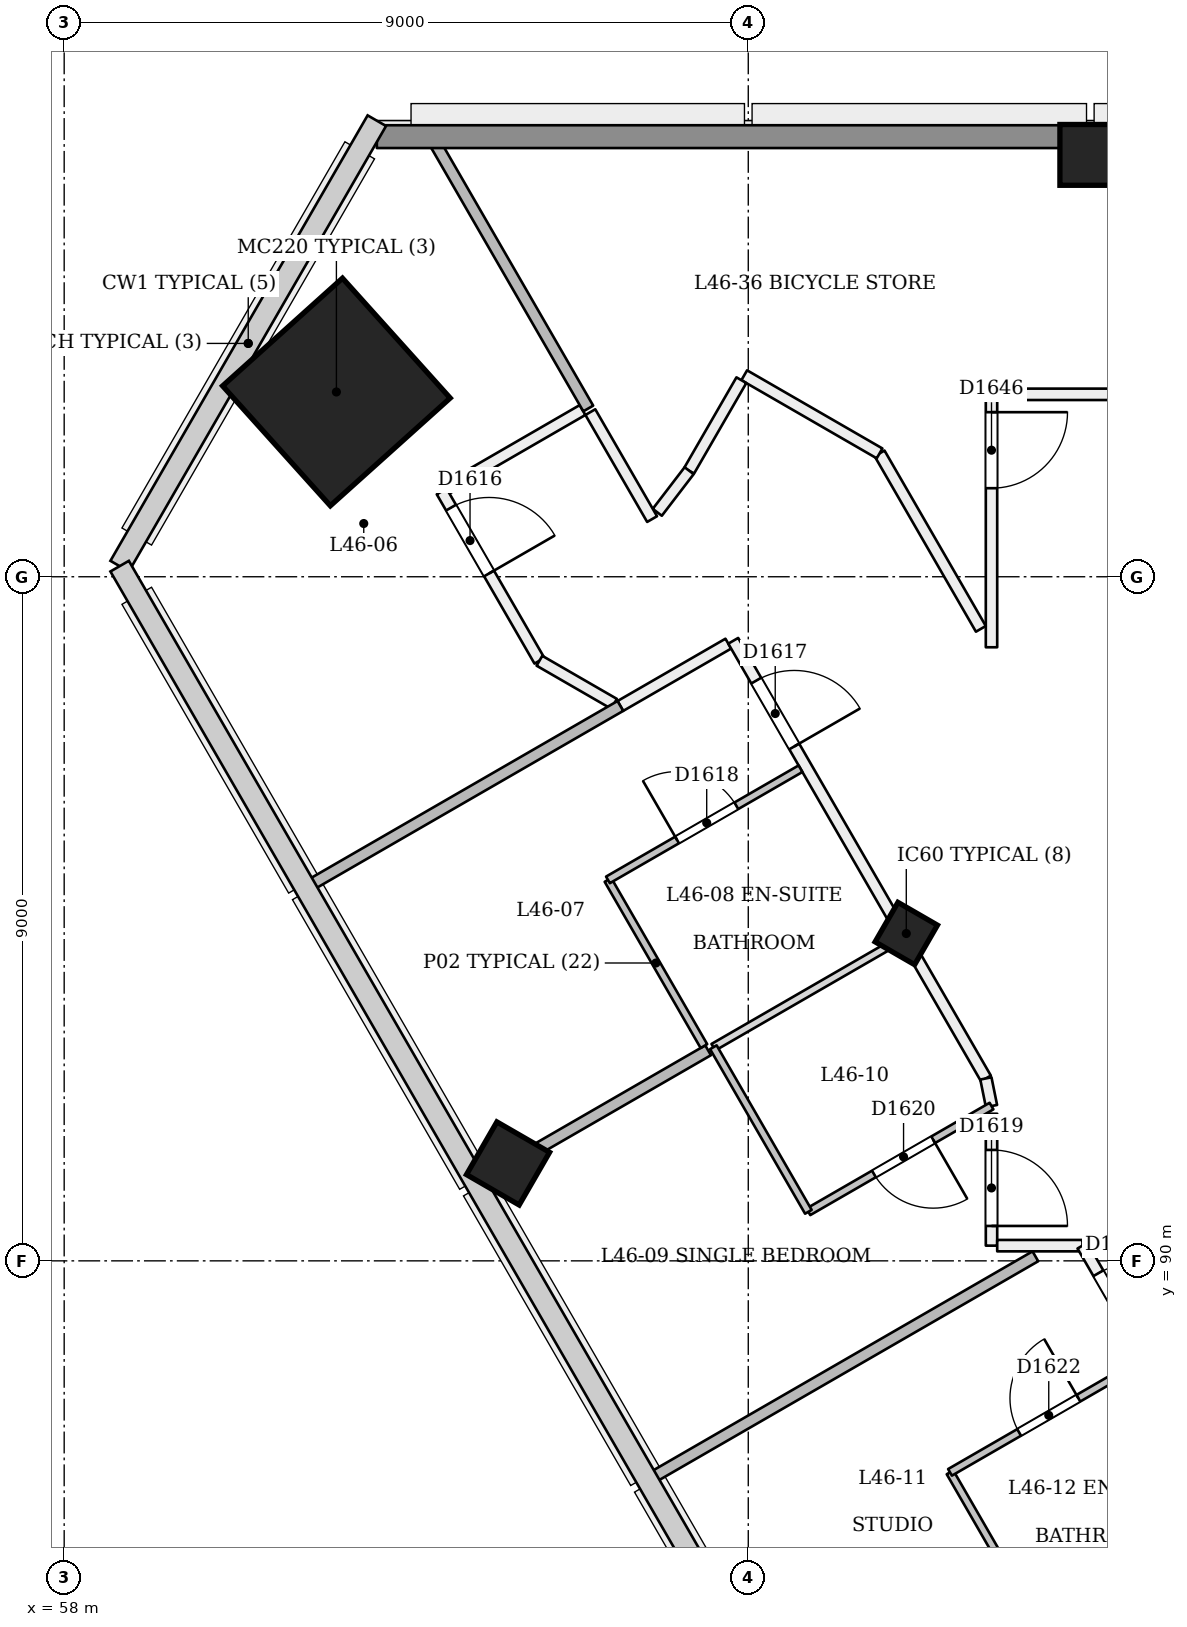
"""IFC4 building model, lengths in metres.
Left out: names, types, materials, properties, quantities, classifications, styles, units other than length and angle.
Written with IfcOpenShell. Run it as: python <this file> out.ifc"""

import sys

from ifc_helpers import new_model, si_unit, direction, frame, frame_2d, origin, origin_2d, place, context, subcontext, project, spatial, rectangle, extrude, element, fill, save


model = new_model("IFC4")
c1 = context("Model", 3, precision=1e-05, world=origin(), true_north=direction((0.0, 1.0)))
c2 = subcontext(c1, "Body", "Model", "MODEL_VIEW")
j1 = project(units=[si_unit("LENGTHUNIT", "METRE"), si_unit("PLANEANGLEUNIT", "RADIAN")], contexts=[c1])
p1 = place(None, origin())
s1 = spatial("IfcSite", under=j1, at=p1, CompositionType="ELEMENT")
p2 = place(p1, origin())
s2 = spatial("IfcBuilding", under=s1, at=p2, CompositionType="ELEMENT")
p3 = place(p2, frame((0.0, 0.0, 178.2)))
s3 = spatial("IfcBuildingStorey", under=s2, at=p3, CompositionType="ELEMENT", Elevation=178.2)
p4 = place(p3, frame((69.052, 94.26, -0.018), z_axis=(0.022222852987, 0.038483477124, 0.999012095419), x_axis=(-0.865642058299, -0.49918203825, 0.038485316572)))
e1 = element("IfcColumn", 1, at=p4, inside=s3, PredefinedType="COLUMN", context=c2, shape_type="SweptSolid", body=[
    extrude(rectangle(XDim=0.6, YDim=0.6, at=origin_2d()), origin(), (0.0, 0.0, 1.0), 3.604),
])
p5 = place(p3, frame((61.547, 101.42, 0.0), z_axis=(0.028401796786, 0.009286506348, 0.999553449666), x_axis=(-0.866206321778, 0.499287135176, 0.019974102218)))
e2 = element("IfcColumn", 2, at=p5, inside=s3, PredefinedType="COLUMN", context=c2, shape_type="SweptSolid", body=[
    extrude(rectangle(XDim=2.12, YDim=2.12, at=origin_2d()), origin(), (0.0, 0.0, 1.0), 3.602),
])
p6 = place(p3, frame((71.5, 104.55, 0.0), z_axis=(0.0, 0.0, 1.0), x_axis=(1.0, 0.0, 0.0)))
e3 = element("IfcColumn", 3, at=p6, inside=s3, PredefinedType="COLUMN", context=c2, shape_type="SweptSolid", body=[
    extrude(rectangle(XDim=0.8, YDim=0.8, at=origin_2d()), origin(), (0.0, 0.0, 1.0), 3.6),
])
p7 = place(p3, frame((63.812, 91.234, -0.024), z_axis=(0.02215519141, 0.038415882353, 0.999016199807), x_axis=(-0.865361947816, -0.499673614488, 0.038405445666)))
e4 = element("IfcColumn", 4, at=p7, inside=s3, PredefinedType="COLUMN", context=c2, shape_type="SweptSolid", body=[
    extrude(rectangle(XDim=0.8, YDim=0.8, at=origin_2d()), origin(), (0.0, 0.0, 1.0), 3.604),
])
p8 = place(p3, frame((64.82, 101.193, 0.0), z_axis=(0.0, 0.0, 1.0), x_axis=(-0.865774039155, -0.500435123793, 0.0)))
e5 = element("IfcWall", 5, at=p8, inside=s3, PredefinedType="PARTITIONING", context=c2, shape_type="SweptSolid", body=[
    extrude(rectangle(XDim=2.066, YDim=0.15, at=frame_2d((1.033, 0.0))), origin(), (0.0, 0.0, 1.0), 3.15),
])
p9 = place(p3, frame((62.967, 100.122, 0.0), z_axis=(0.0, 0.0, 1.0), x_axis=(0.499988145349, -0.866032247962, 0.0)))
e6 = element("IfcWall", 6, at=p9, inside=s3, PredefinedType="PARTITIONING", context=c2, shape_type="SweptSolid", body=[
    extrude(rectangle(XDim=2.572, YDim=0.15, at=frame_2d((1.286, 0.0))), origin(), (0.0, 0.0, 1.0), 3.15),
])
p10 = place(p9, frame((0.246, 0.0, 0.0)))
e7 = element("IfcOpeningElement", 7, at=p10, cuts=e6, PredefinedType="OPENING", context=c2, shape_type="SweptSolid", body=[
    extrude(rectangle(XDim=1.0, YDim=2.1, at=frame_2d((0.5, 1.05))), frame((0.0, 0.085, 0.0), z_axis=(0.0, -1.0, 0.0), x_axis=(1.0, 0.0, 0.0)), (0.0, 0.0, 1.0), 0.171),
])
p11 = place(p3, frame((64.252, 97.895, 0.0), z_axis=(0.0, 0.0, 1.0), x_axis=(0.865966686804, -0.500101687005, 0.0)))
e8 = element("IfcWall", 8, at=p11, inside=s3, PredefinedType="PARTITIONING", context=c2, shape_type="SweptSolid", body=[
    extrude(rectangle(XDim=1.133, YDim=0.15, at=frame_2d((0.566, 0.0))), origin(), (0.0, 0.0, 1.0), 3.15),
])
p12 = place(p3, frame((65.317, 97.3, 0.0), z_axis=(0.0, 0.0, 1.0), x_axis=(0.866016967894, 0.500014611105, 0.0)))
e9 = element("IfcWall", 9, at=p12, inside=s3, PredefinedType="PARTITIONING", context=c2, shape_type="SweptSolid", body=[
    extrude(rectangle(XDim=1.64, YDim=0.15, at=frame_2d((0.82, 0.0))), origin(), (0.0, 0.0, 1.0), 3.15),
])
p13 = place(p3, frame((66.802, 98.157, 0.0), z_axis=(0.0, 0.0, 1.0), x_axis=(0.499982058975, -0.866035761792, 0.0)))
e10 = element("IfcWall", 10, at=p13, inside=s3, PredefinedType="PARTITIONING", context=c2, shape_type="SweptSolid", body=[
    extrude(rectangle(XDim=6.648, YDim=0.15, at=frame_2d((3.324, 0.0))), origin(), (0.0, 0.0, 1.0), 2.75),
])
p14 = place(p13, frame((0.605, 0.0, 0.0)))
e11 = element("IfcOpeningElement", 11, at=p14, cuts=e10, PredefinedType="OPENING", context=c2, shape_type="SweptSolid", body=[
    extrude(rectangle(XDim=1.0, YDim=2.1, at=frame_2d((0.5, 1.05))), frame((0.0, 0.085, 0.0), z_axis=(0.0, -1.0, 0.0), x_axis=(1.0, 0.0, 0.0)), (0.0, 0.0, 1.0), 0.171),
])
p15 = place(p3, frame((70.2, 91.935, 0.0), z_axis=(0.0, 0.0, 1.0), x_axis=(0.0, -1.0, 0.0)))
e12 = element("IfcWall", 12, at=p15, inside=s3, PredefinedType="PARTITIONING", context=c2, shape_type="SweptSolid", body=[
    extrude(rectangle(XDim=1.735, YDim=0.15, at=frame_2d((0.868, 0.0))), origin(), (0.0, 0.0, 1.0), 3.15),
])
p16 = place(p15, frame((0.476, 0.0, 0.0)))
e13 = element("IfcOpeningElement", 13, at=p16, cuts=e12, PredefinedType="OPENING", context=c2, shape_type="SweptSolid", body=[
    extrude(rectangle(XDim=1.0, YDim=2.1, at=frame_2d((0.5, 1.05))), frame((0.0, 0.085, 0.0), z_axis=(0.0, -1.0, 0.0), x_axis=(1.0, 0.0, 0.0)), (0.0, 0.0, 1.0), 0.171),
])
p17 = place(p3, frame((70.275, 90.2, 0.0), z_axis=(0.0, 0.0, 1.0), x_axis=(1.0, 0.0, 0.0)))
e14 = element("IfcWall", 14, at=p17, inside=s3, PredefinedType="PARTITIONING", context=c2, shape_type="SweptSolid", body=[
    extrude(rectangle(XDim=1.122, YDim=0.15, at=frame_2d((0.561, 0.0))), origin(), (0.0, 0.0, 1.0), 3.15),
])
p18 = place(p3, frame((70.126, 92.4, 0.0), z_axis=(0.0, 0.0, 1.0), x_axis=(0.198645351923, -0.980071438294, 0.0)))
e15 = element("IfcWall", 15, at=p18, inside=s3, PredefinedType="PARTITIONING", context=c2, shape_type="SweptSolid", body=[
    extrude(rectangle(XDim=0.371, YDim=0.15, at=frame_2d((0.186, 0.0))), origin(), (0.0, 0.0, 1.0), 3.15),
])
p19 = place(p3, frame((71.396, 90.2, 0.0), z_axis=(0.0, 0.0, 1.0), x_axis=(0.500000568002, -0.866025075848, 0.0)))
e16 = element("IfcWall", 16, at=p19, inside=s3, PredefinedType="PARTITIONING", context=c2, shape_type="SweptSolid", body=[
    extrude(rectangle(XDim=27.077, YDim=0.15, at=frame_2d((13.539, 0.0))), origin(), (0.0, 0.0, 1.0), 2.75),
])
p20 = place(p19, frame((0.419, 0.0, 0.0)))
e17 = element("IfcOpeningElement", 17, at=p20, cuts=e16, PredefinedType="OPENING", context=c2, shape_type="SweptSolid", body=[
    extrude(rectangle(XDim=1.0, YDim=2.1, at=frame_2d((0.5, 1.05))), frame((0.0, 0.085, 0.0), z_axis=(0.0, -1.0, 0.0), x_axis=(1.0, 0.0, 0.0)), (0.0, 0.0, 1.0), 0.171),
])
p21 = place(p19, frame((7.091, 0.0, 0.0)))
e18 = element("IfcOpeningElement", 18, at=p21, cuts=e16, PredefinedType="OPENING", context=c2, shape_type="SweptSolid", body=[
    extrude(rectangle(XDim=1.0, YDim=2.1, at=frame_2d((0.5, 1.05))), frame((0.0, 0.085, 0.0), z_axis=(0.0, -1.0, 0.0), x_axis=(1.0, 0.0, 0.0)), (0.0, 0.0, 1.0), 0.171),
])
p22 = place(p19, frame((9.532, 0.0, 0.0)))
e19 = element("IfcOpeningElement", 19, at=p22, cuts=e16, PredefinedType="OPENING", context=c2, shape_type="SweptSolid", body=[
    extrude(rectangle(XDim=1.0, YDim=2.1, at=frame_2d((0.5, 1.05))), frame((0.0, 0.085, 0.0), z_axis=(0.0, -1.0, 0.0), x_axis=(1.0, 0.0, 0.0)), (0.0, 0.0, 1.0), 0.171),
])
p23 = place(p19, frame((16.091, 0.0, 0.0)))
e20 = element("IfcOpeningElement", 20, at=p23, cuts=e16, PredefinedType="OPENING", context=c2, shape_type="SweptSolid", body=[
    extrude(rectangle(XDim=1.0, YDim=2.1, at=frame_2d((0.5, 1.05))), frame((0.0, 0.085, 0.0), z_axis=(0.0, -1.0, 0.0), x_axis=(1.0, 0.0, 0.0)), (0.0, 0.0, 1.0), 0.171),
])
p24 = place(p19, frame((18.416, 0.0, 0.0)))
e21 = element("IfcOpeningElement", 21, at=p24, cuts=e16, PredefinedType="OPENING", context=c2, shape_type="SweptSolid", body=[
    extrude(rectangle(XDim=1.0, YDim=2.1, at=frame_2d((0.5, 1.05))), frame((0.0, 0.085, 0.0), z_axis=(0.0, -1.0, 0.0), x_axis=(1.0, 0.0, 0.0)), (0.0, 0.0, 1.0), 0.171),
])
p25 = place(p19, frame((25.432, 0.0, 0.0)))
e22 = element("IfcOpeningElement", 22, at=p25, cuts=e16, PredefinedType="OPENING", context=c2, shape_type="SweptSolid", body=[
    extrude(rectangle(XDim=1.2, YDim=2.1, at=frame_2d((0.6, 1.05))), frame((0.0, 0.085, 0.0), z_axis=(0.0, -1.0, 0.0), x_axis=(1.0, 0.0, 0.0)), (0.0, 0.0, 1.0), 0.171),
])
p26 = place(p3, frame((72.0, 101.4, 0.0), z_axis=(0.0, 0.0, 1.0), x_axis=(-1.0, 0.0, 0.0)))
e23 = element("IfcWall", 23, at=p26, inside=s3, PredefinedType="PARTITIONING", context=c2, shape_type="SweptSolid", body=[
    extrude(rectangle(XDim=1.725, YDim=0.15, at=frame_2d((0.863, 0.0))), origin(), (0.0, 0.0, 1.0), 3.15),
])
p27 = place(p3, frame((70.2, 101.4, 0.0), z_axis=(0.0, 0.0, 1.0), x_axis=(0.0, -1.0, 0.0)))
e24 = element("IfcWall", 24, at=p27, inside=s3, PredefinedType="PARTITIONING", context=c2, shape_type="SweptSolid", body=[
    extrude(rectangle(XDim=3.328, YDim=0.15, at=frame_2d((1.664, 0.0))), origin(), (0.0, 0.0, 1.0), 3.15),
])
p28 = place(p27, frame((0.235, 0.0, 0.0)))
e25 = element("IfcOpeningElement", 25, at=p28, cuts=e24, PredefinedType="OPENING", context=c2, shape_type="SweptSolid", body=[
    extrude(rectangle(XDim=1.0, YDim=2.1, at=frame_2d((0.5, 1.05))), frame((0.0, 0.085, 0.0), z_axis=(0.0, -1.0, 0.0), x_axis=(1.0, 0.0, 0.0)), (0.0, 0.0, 1.0), 0.171),
])
p29 = place(p3, frame((70.06, 98.315, 0.0), z_axis=(0.0, 0.0, 1.0), x_axis=(-0.500010524421, 0.866019327422, 0.0)))
e26 = element("IfcWall", 26, at=p29, inside=s3, PredefinedType="PARTITIONING", context=c2, shape_type="SweptSolid", body=[
    extrude(rectangle(XDim=2.666, YDim=0.15, at=frame_2d((1.333, 0.0))), origin(), (0.0, 0.0, 1.0), 3.15),
])
p30 = place(p3, frame((68.727, 100.623, 0.0), z_axis=(0.0, 0.0, 1.0), x_axis=(-0.866027366358, 0.499996600708, 0.0)))
e27 = element("IfcWall", 27, at=p30, inside=s3, PredefinedType="PARTITIONING", context=c2, shape_type="SweptSolid", body=[
    extrude(rectangle(XDim=2.056, YDim=0.15, at=frame_2d((1.028, 0.0))), origin(), (0.0, 0.0, 1.0), 3.15),
])
p31 = place(p3, frame((66.909, 101.586, 0.0), z_axis=(0.0, 0.0, 1.0), x_axis=(-0.499958106649, -0.866049589571, 0.0)))
e28 = element("IfcWall", 28, at=p31, inside=s3, PredefinedType="PARTITIONING", context=c2, shape_type="SweptSolid", body=[
    extrude(rectangle(XDim=1.375, YDim=0.15, at=frame_2d((0.688, 0.0))), origin(), (0.0, 0.0, 1.0), 3.15),
])
p32 = place(p3, frame((66.222, 100.395, 0.0), z_axis=(0.0, 0.0, 1.0), x_axis=(-0.607962851569, -0.793965472242, 0.0)))
e29 = element("IfcWall", 29, at=p32, inside=s3, PredefinedType="PARTITIONING", context=c2, shape_type="SweptSolid", body=[
    extrude(rectangle(XDim=0.689, YDim=0.15, at=frame_2d((0.345, 0.0))), origin(), (0.0, 0.0, 1.0), 3.15),
])
p33 = place(p3, frame((65.735, 99.759, 0.0), z_axis=(0.0, 0.0, 1.0), x_axis=(-0.499839503961, 0.866118046389, 0.0)))
e30 = element("IfcWall", 30, at=p33, inside=s3, PredefinedType="PARTITIONING", context=c2, shape_type="SweptSolid", body=[
    extrude(rectangle(XDim=1.625, YDim=0.15, at=frame_2d((0.812, 0.0))), origin(), (0.0, 0.0, 1.0), 3.15),
])
p34 = place(p3, frame((61.242, 94.947, 0.0), z_axis=(0.0, 0.0, 1.0), x_axis=(0.866028339916, 0.499994914436, 0.0)))
e31 = element("IfcWall", 31, at=p34, inside=s3, PredefinedType="PARTITIONING", context=c2, shape_type="SweptSolid", body=[
    extrude(rectangle(XDim=4.706, YDim=0.15, at=frame_2d((2.353, 0.0))), origin(), (0.0, 0.0, 1.0), 2.65),
])
p35 = place(p3, frame((64.895, 101.214, 0.0), z_axis=(0.0, 0.0, 1.0), x_axis=(-0.500025305846, 0.866010792954, 0.0)))
e32 = element("IfcWall", 32, at=p35, inside=s3, PredefinedType="PARTITIONING", context=c2, shape_type="SweptSolid", body=[
    extrude(rectangle(XDim=4.257, YDim=0.15, at=frame_2d((2.128, 0.0))), origin(), (0.0, 0.0, 1.0), 2.65),
])
p36 = place(p3, frame((66.417, 92.825, 0.0), z_axis=(0.0, 0.0, 1.0), x_axis=(-0.499976333282, 0.866039067339, 0.0)))
e33 = element("IfcWall", 33, at=p36, inside=s3, PredefinedType="PARTITIONING", context=c2, shape_type="SweptSolid", body=[
    extrude(rectangle(XDim=2.525, YDim=0.1, at=frame_2d((1.262, 0.0))), origin(), (0.0, 0.0, 1.0), 2.75),
])
p37 = place(p3, frame((65.154, 95.012, 0.0), z_axis=(0.0, 0.0, 1.0), x_axis=(0.866046596414, 0.499963291492, 0.0)))
e34 = element("IfcWall", 34, at=p37, inside=s3, PredefinedType="PARTITIONING", context=c2, shape_type="SweptSolid", body=[
    extrude(rectangle(XDim=2.925, YDim=0.1, at=frame_2d((1.462, 0.0))), origin(), (0.0, 0.0, 1.0), 3.15),
])
p38 = place(p37, frame((1.05, 0.0, 0.0)))
e35 = element("IfcOpeningElement", 35, at=p38, cuts=e34, PredefinedType="OPENING", context=c2, shape_type="SweptSolid", body=[
    extrude(rectangle(XDim=0.9, YDim=2.1, at=frame_2d((0.45, 1.05))), frame((0.0, 0.061, 0.0), z_axis=(0.0, -1.0, 0.0), x_axis=(1.0, 0.0, 0.0)), (0.0, 0.0, 1.0), 0.121),
])
p39 = place(p3, frame((63.51, 91.06, 0.0), z_axis=(0.0, 0.0, 1.0), x_axis=(0.866038183914, 0.499977863513, 0.0)))
e36 = element("IfcWall", 36, at=p39, inside=s3, PredefinedType="PARTITIONING", context=c2, shape_type="SweptSolid", body=[
    extrude(rectangle(XDim=3.42, YDim=0.15, at=frame_2d((1.71, 0.0))), origin(), (0.0, 0.0, 1.0), 2.65),
])
p40 = place(p3, frame((66.541, 92.81, 0.0), z_axis=(0.0, 0.0, 1.0), x_axis=(0.866011447264, 0.500024172624, 0.0)))
e37 = element("IfcWall", 37, at=p40, inside=s3, PredefinedType="PARTITIONING", context=c2, shape_type="SweptSolid", body=[
    extrude(rectangle(XDim=2.825, YDim=0.1, at=frame_2d((1.413, 0.0))), origin(), (0.0, 0.0, 1.0), 2.75),
])
p41 = place(p3, frame((70.2, 92.036, 0.0), z_axis=(0.0, 0.0, 1.0), x_axis=(-0.866036517529, -0.499980749935, 0.0)))
e38 = element("IfcWall", 38, at=p41, inside=s3, PredefinedType="PARTITIONING", context=c2, shape_type="SweptSolid", body=[
    extrude(rectangle(XDim=2.782, YDim=0.1, at=frame_2d((1.391, 0.0))), origin(), (0.0, 0.0, 1.0), 3.15),
])
p42 = place(p41, frame((0.886, 0.0, 0.0)))
e39 = element("IfcOpeningElement", 39, at=p42, cuts=e38, PredefinedType="OPENING", context=c2, shape_type="SweptSolid", body=[
    extrude(rectangle(XDim=0.9, YDim=2.1, at=frame_2d((0.45, 1.05))), frame((0.0, 0.061, 0.0), z_axis=(0.0, -1.0, 0.0), x_axis=(1.0, 0.0, 0.0)), (0.0, 0.0, 1.0), 0.121),
])
p43 = place(p3, frame((67.791, 90.645, 0.0), z_axis=(0.0, 0.0, 1.0), x_axis=(-0.500004234368, 0.866022959057, 0.0)))
e40 = element("IfcWall", 40, at=p43, inside=s3, PredefinedType="PARTITIONING", context=c2, shape_type="SweptSolid", body=[
    extrude(rectangle(XDim=2.5, YDim=0.1, at=frame_2d((1.25, 0.0))), origin(), (0.0, 0.0, 1.0), 2.75),
])
p44 = place(p3, frame((65.742, 87.153, 0.0), z_axis=(0.0, 0.0, 1.0), x_axis=(0.866019850528, 0.500009618399, 0.0)))
e41 = element("IfcWall", 41, at=p44, inside=s3, PredefinedType="PARTITIONING", context=c2, shape_type="SweptSolid", body=[
    extrude(rectangle(XDim=5.814, YDim=0.15, at=frame_2d((2.907, 0.0))), origin(), (0.0, 0.0, 1.0), 2.65),
])
p45 = place(p3, frame((70.917, 85.031, 0.0), z_axis=(0.0, 0.0, 1.0), x_axis=(-0.499976333282, 0.866039067339, 0.0)))
e42 = element("IfcWall", 42, at=p45, inside=s3, PredefinedType="PARTITIONING", context=c2, shape_type="SweptSolid", body=[
    extrude(rectangle(XDim=2.525, YDim=0.1, at=frame_2d((1.262, 0.0))), origin(), (0.0, 0.0, 1.0), 2.75),
])
p46 = place(p3, frame((69.654, 87.218, 0.0), z_axis=(0.0, 0.0, 1.0), x_axis=(0.866046596414, 0.499963291492, 0.0)))
e43 = element("IfcWall", 43, at=p46, inside=s3, PredefinedType="PARTITIONING", context=c2, shape_type="SweptSolid", body=[
    extrude(rectangle(XDim=2.925, YDim=0.1, at=frame_2d((1.462, 0.0))), origin(), (0.0, 0.0, 1.0), 3.15),
])
p47 = place(p46, frame((1.05, 0.0, 0.0)))
e44 = element("IfcOpeningElement", 44, at=p47, cuts=e43, PredefinedType="OPENING", context=c2, shape_type="SweptSolid", body=[
    extrude(rectangle(XDim=0.9, YDim=2.1, at=frame_2d((0.45, 1.05))), frame((0.0, 0.061, 0.0), z_axis=(0.0, -1.0, 0.0), x_axis=(1.0, 0.0, 0.0)), (0.0, 0.0, 1.0), 0.121),
])
p48 = place(p3, frame((71.041, 85.016, 0.0), z_axis=(0.0, 0.0, 1.0), x_axis=(0.866048868473, 0.499959355765, 0.0)))
e45 = element("IfcWall", 45, at=p48, inside=s3, PredefinedType="PARTITIONING", context=c2, shape_type="SweptSolid", body=[
    extrude(rectangle(XDim=2.825, YDim=0.1, at=frame_2d((1.413, 0.0))), origin(), (0.0, 0.0, 1.0), 2.75),
])
p49 = place(p3, frame((62.113, 104.79, 0.0), z_axis=(0.0, 0.0, 1.0), x_axis=(1.0, 0.0, 0.0)))
e46 = element("IfcWall", 46, at=p49, inside=s3, PredefinedType="SOLIDWALL", context=c2, shape_type="SweptSolid", body=[
    extrude(rectangle(XDim=45.773, YDim=0.3, at=frame_2d((22.887, 0.0))), origin(), (0.0, 0.0, 1.0), 2.65),
])
p50 = place(p10, origin())
e47 = element("IfcDoor", 47, at=p50, inside=s3, OperationType="SINGLE_SWING_RIGHT", PredefinedType="NOTDEFINED", context=c2, shape_type="SweptSolid", body=[
    extrude(rectangle(XDim=1.0, YDim=2.1, at=frame_2d((0.5, 1.05))), frame((0.0, 0.025, 0.0), z_axis=(0.0, -1.0, 0.0), x_axis=(1.0, 0.0, 0.0)), (0.0, 0.0, 1.0), 0.05),
])
fill(e7, e47)
p51 = place(p14, origin())
e48 = element("IfcDoor", 48, at=p51, inside=s3, OperationType="SINGLE_SWING_RIGHT", PredefinedType="NOTDEFINED", context=c2, shape_type="SweptSolid", body=[
    extrude(rectangle(XDim=1.0, YDim=2.1, at=frame_2d((0.5, 1.05))), frame((0.0, 0.025, 0.0), z_axis=(0.0, -1.0, 0.0), x_axis=(1.0, 0.0, 0.0)), (0.0, 0.0, 1.0), 0.05),
])
fill(e11, e48)
p52 = place(p38, origin())
e49 = element("IfcDoor", 49, at=p52, inside=s3, OperationType="SINGLE_SWING_LEFT", PredefinedType="NOTDEFINED", context=c2, shape_type="SweptSolid", body=[
    extrude(rectangle(XDim=0.9, YDim=2.1, at=frame_2d((0.45, 1.05))), frame((0.0, 0.025, 0.0), z_axis=(0.0, -1.0, 0.0), x_axis=(1.0, 0.0, 0.0)), (0.0, 0.0, 1.0), 0.05),
])
fill(e35, e49)
p53 = place(p16, origin())
e50 = element("IfcDoor", 50, at=p53, inside=s3, OperationType="SINGLE_SWING_RIGHT", PredefinedType="NOTDEFINED", context=c2, shape_type="SweptSolid", body=[
    extrude(rectangle(XDim=1.0, YDim=2.1, at=frame_2d((0.5, 1.05))), frame((0.0, 0.025, 0.0), z_axis=(0.0, -1.0, 0.0), x_axis=(1.0, 0.0, 0.0)), (0.0, 0.0, 1.0), 0.05),
])
fill(e13, e50)
p54 = place(p42, origin())
e51 = element("IfcDoor", 51, at=p54, inside=s3, OperationType="SINGLE_SWING_LEFT", PredefinedType="NOTDEFINED", context=c2, shape_type="SweptSolid", body=[
    extrude(rectangle(XDim=0.9, YDim=2.1, at=frame_2d((0.45, 1.05))), frame((0.0, 0.025, 0.0), z_axis=(0.0, -1.0, 0.0), x_axis=(1.0, 0.0, 0.0)), (0.0, 0.0, 1.0), 0.05),
])
fill(e39, e51)
p55 = place(p20, origin())
e52 = element("IfcDoor", 52, at=p55, inside=s3, OperationType="SINGLE_SWING_RIGHT", PredefinedType="NOTDEFINED", context=c2, shape_type="SweptSolid", body=[
    extrude(rectangle(XDim=1.0, YDim=2.1, at=frame_2d((0.5, 1.05))), frame((0.0, 0.025, 0.0), z_axis=(0.0, -1.0, 0.0), x_axis=(1.0, 0.0, 0.0)), (0.0, 0.0, 1.0), 0.05),
])
fill(e17, e52)
p56 = place(p47, origin())
e53 = element("IfcDoor", 53, at=p56, inside=s3, OperationType="SINGLE_SWING_RIGHT", PredefinedType="NOTDEFINED", context=c2, shape_type="SweptSolid", body=[
    extrude(rectangle(XDim=0.9, YDim=2.1, at=frame_2d((0.45, 1.05))), frame((0.0, 0.025, 0.0), z_axis=(0.0, -1.0, 0.0), x_axis=(1.0, 0.0, 0.0)), (0.0, 0.0, 1.0), 0.05),
])
fill(e44, e53)
p57 = place(p28, origin())
e54 = element("IfcDoor", 54, at=p57, inside=s3, OperationType="SINGLE_SWING_LEFT", PredefinedType="NOTDEFINED", context=c2, shape_type="SweptSolid", body=[
    extrude(rectangle(XDim=1.0, YDim=2.1, at=frame_2d((0.5, 1.05))), frame((0.0, 0.025, 0.0), z_axis=(0.0, -1.0, 0.0), x_axis=(1.0, 0.0, 0.0)), (0.0, 0.0, 1.0), 0.05),
])
fill(e25, e54)
save(model, sys.argv[1])
